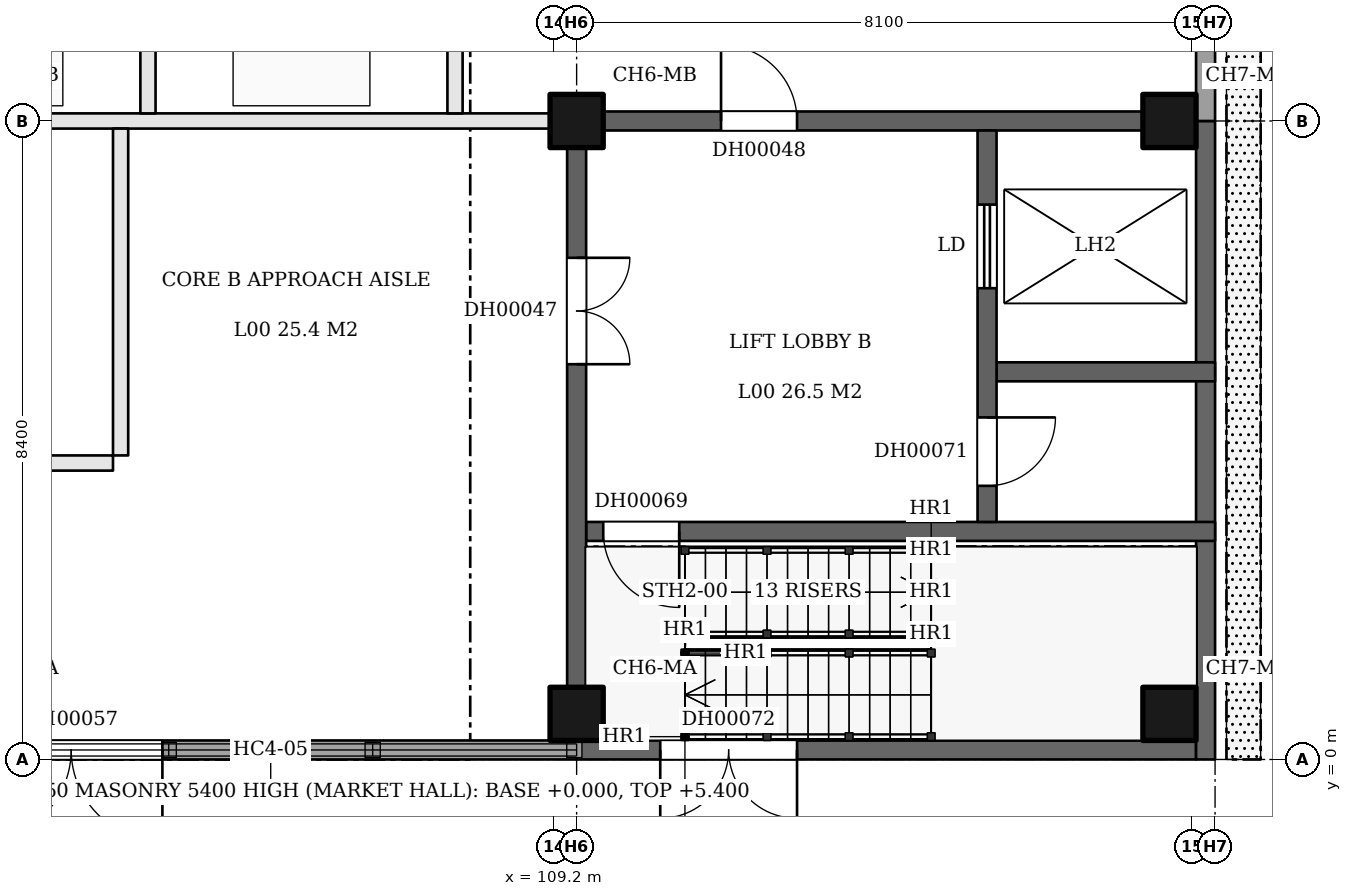
"""IFC4 building model, lengths in metres.
Left out: names, types, materials, properties, quantities, classifications, styles, units other than length and angle.
Written with IfcOpenShell. Run it as: python <this file> out.ifc"""

import sys

from ifc_helpers import new_model, si_unit, direction, frame, frame_2d, origin, origin_2d, place, context, subcontext, project, spatial, rectangle, extrude, element, fill, save


model = new_model("IFC4")
c1 = context("Model", 3, precision=1e-05, world=origin(), true_north=direction((0.0, 1.0)))
c2 = subcontext(c1, "Body", "Model", "MODEL_VIEW")
j1 = project(units=[si_unit("LENGTHUNIT", "METRE"), si_unit("PLANEANGLEUNIT", "RADIAN")], contexts=[c1])
p1 = place(None, origin())
s1 = spatial("IfcSite", under=j1, at=p1, CompositionType="ELEMENT")
p2 = place(p1, origin())
s2 = spatial("IfcBuilding", under=s1, at=p2, CompositionType="ELEMENT")
p3 = place(p2, origin())
s3 = spatial("IfcBuildingStorey", under=s2, at=p3, CompositionType="ELEMENT", Elevation=0.0)
for number, where, z_axis, x_axis in (
    (1, (109.5, 0.6, 0.0), (0.0, 0.0, 1.0), (1.0, 0.0, 0.0)),
    (2, (109.5, 8.4, 0.0), (0.0, 0.0, 1.0), (1.0, 0.0, 0.0)),
    (3, (117.3, 0.6, 0.0), (0.0, 0.0, 1.0), (1.0, 0.0, 0.0)),
    (4, (117.3, 8.4, 0.0), (0.0, 0.0, 1.0), (1.0, 0.0, 0.0)),
):
    element("IfcColumn", number, at=place(p3, frame(where, z_axis=z_axis, x_axis=x_axis)), inside=s3, PredefinedType="COLUMN", context=c2, shape_type="SweptSolid", body=[
        extrude(rectangle(XDim=0.7, YDim=0.7, at=origin_2d()), origin(), (0.0, 0.0, 1.0), 8.7),
    ])
p4 = place(p3, frame((101.45, 0.125, 0.0), z_axis=(0.0, 0.0, 1.0), x_axis=(1.0, 0.0, 0.0)))
e5 = element("IfcWall", 5, at=p4, inside=s3, PredefinedType="SOLIDWALL", context=c2, shape_type="SweptSolid", body=[
    extrude(rectangle(XDim=8.05, YDim=0.25, at=frame_2d((4.025, 0.0))), origin(), (0.0, 0.0, 1.0), 5.4),
])
p5 = place(p4, frame((0.2, 0.0, 0.0)))
e6 = element("IfcOpeningElement", 6, at=p5, cuts=e5, PredefinedType="OPENING", context=c2, shape_type="SweptSolid", body=[
    extrude(rectangle(XDim=2.4, YDim=2.4, at=frame_2d((1.2, 1.2))), frame((0.0, 0.135, 0.0), z_axis=(0.0, -1.0, 0.0), x_axis=(1.0, 0.0, 0.0)), (0.0, 0.0, 1.0), 0.27),
])
p6 = place(p3, frame((109.5, 0.125, 0.0), z_axis=(0.0, 0.0, 1.0), x_axis=(1.0, 0.0, 0.0)))
e7 = element("IfcWall", 7, at=p6, inside=s3, PredefinedType="SHEAR", context=c2, shape_type="SweptSolid", body=[
    extrude(rectangle(XDim=8.15, YDim=0.25, at=frame_2d((4.075, 0.0))), origin(), (0.0, 0.0, 1.0), 8.7),
])
p7 = place(p6, frame((1.1, 0.0, 0.0)))
e8 = element("IfcOpeningElement", 8, at=p7, cuts=e7, PredefinedType="OPENING", context=c2, shape_type="SweptSolid", body=[
    extrude(rectangle(XDim=1.8, YDim=2.1, at=frame_2d((0.9, 1.05))), frame((0.0, 0.135, 0.0), z_axis=(0.0, -1.0, 0.0), x_axis=(1.0, 0.0, 0.0)), (0.0, 0.0, 1.0), 0.27),
])
p8 = place(p3, frame((109.625, 3.0, 0.0), z_axis=(0.0, 0.0, 1.0), x_axis=(1.0, 0.0, 0.0)))
e9 = element("IfcWall", 9, at=p8, inside=s3, PredefinedType="SHEAR", context=c2, shape_type="SweptSolid", body=[
    extrude(rectangle(XDim=8.275, YDim=0.25, at=frame_2d((4.137, 0.0))), origin(), (0.0, 0.0, 1.0), 8.7),
])
p9 = place(p8, frame((0.225, 0.0, 0.0)))
e10 = element("IfcOpeningElement", 10, at=p9, cuts=e9, PredefinedType="OPENING", context=c2, shape_type="SweptSolid", body=[
    extrude(rectangle(XDim=1.0, YDim=2.1, at=frame_2d((0.5, 1.05))), frame((0.0, 0.135, 0.0), z_axis=(0.0, -1.0, 0.0), x_axis=(1.0, 0.0, 0.0)), (0.0, 0.0, 1.0), 0.27),
])
p10 = place(p3, frame((68.35, 3.9, 0.0), z_axis=(0.0, 0.0, 1.0), x_axis=(1.0, 0.0, 0.0)))
e11 = element("IfcWall", 11, at=p10, inside=s3, PredefinedType="PARTITIONING", context=c2, shape_type="SweptSolid", body=[
    extrude(rectangle(XDim=35.05, YDim=0.2, at=frame_2d((17.525, 0.0))), origin(), (0.0, 0.0, 1.0), 8.7),
])
p11 = place(p10, frame((1.65, 0.0, 0.0)))
e12 = element("IfcOpeningElement", 12, at=p11, cuts=e11, PredefinedType="OPENING", context=c2, shape_type="SweptSolid", body=[
    extrude(rectangle(XDim=1.0, YDim=2.1, at=frame_2d((0.5, 1.05))), frame((0.0, 0.11, 0.0), z_axis=(0.0, -1.0, 0.0), x_axis=(1.0, 0.0, 0.0)), (0.0, 0.0, 1.0), 0.22),
])
p12 = place(p10, frame((7.65, 0.0, 0.0)))
e13 = element("IfcOpeningElement", 13, at=p12, cuts=e11, PredefinedType="OPENING", context=c2, shape_type="SweptSolid", body=[
    extrude(rectangle(XDim=1.0, YDim=2.1, at=frame_2d((0.5, 1.05))), frame((0.0, 0.11, 0.0), z_axis=(0.0, -1.0, 0.0), x_axis=(1.0, 0.0, 0.0)), (0.0, 0.0, 1.0), 0.22),
])
p13 = place(p10, frame((13.65, 0.0, 0.0)))
e14 = element("IfcOpeningElement", 14, at=p13, cuts=e11, PredefinedType="OPENING", context=c2, shape_type="SweptSolid", body=[
    extrude(rectangle(XDim=1.0, YDim=2.1, at=frame_2d((0.5, 1.05))), frame((0.0, 0.11, 0.0), z_axis=(0.0, -1.0, 0.0), x_axis=(1.0, 0.0, 0.0)), (0.0, 0.0, 1.0), 0.22),
])
p14 = place(p10, frame((19.65, 0.0, 0.0)))
e15 = element("IfcOpeningElement", 15, at=p14, cuts=e11, PredefinedType="OPENING", context=c2, shape_type="SweptSolid", body=[
    extrude(rectangle(XDim=1.0, YDim=2.1, at=frame_2d((0.5, 1.05))), frame((0.0, 0.11, 0.0), z_axis=(0.0, -1.0, 0.0), x_axis=(1.0, 0.0, 0.0)), (0.0, 0.0, 1.0), 0.22),
])
p15 = place(p10, frame((25.65, 0.0, 0.0)))
e16 = element("IfcOpeningElement", 16, at=p15, cuts=e11, PredefinedType="OPENING", context=c2, shape_type="SweptSolid", body=[
    extrude(rectangle(XDim=1.0, YDim=2.1, at=frame_2d((0.5, 1.05))), frame((0.0, 0.11, 0.0), z_axis=(0.0, -1.0, 0.0), x_axis=(1.0, 0.0, 0.0)), (0.0, 0.0, 1.0), 0.22),
])
p16 = place(p10, frame((31.65, 0.0, 0.0)))
e17 = element("IfcOpeningElement", 17, at=p16, cuts=e11, PredefinedType="OPENING", context=c2, shape_type="SweptSolid", body=[
    extrude(rectangle(XDim=1.0, YDim=2.1, at=frame_2d((0.5, 1.05))), frame((0.0, 0.11, 0.0), z_axis=(0.0, -1.0, 0.0), x_axis=(1.0, 0.0, 0.0)), (0.0, 0.0, 1.0), 0.22),
])
p17 = place(p3, frame((115.025, 5.1, 0.0), z_axis=(0.0, 0.0, 1.0), x_axis=(1.0, 0.0, 0.0)))
e18 = element("IfcWall", 18, at=p17, inside=s3, PredefinedType="SHEAR", context=c2, shape_type="SweptSolid", body=[
    extrude(rectangle(XDim=2.875, YDim=0.25, at=frame_2d((1.438, 0.0))), origin(), (0.0, 0.0, 1.0), 8.7),
])
p18 = place(p3, frame((101.45, 8.4, 0.0), z_axis=(0.0, 0.0, 1.0), x_axis=(1.0, 0.0, 0.0)))
e19 = element("IfcWall", 19, at=p18, inside=s3, PredefinedType="PARTITIONING", context=c2, shape_type="SweptSolid", body=[
    extrude(rectangle(XDim=7.7, YDim=0.2, at=frame_2d((3.85, 0.0))), origin(), (0.0, 0.0, 1.0), 8.7),
])
p19 = place(p3, frame((109.85, 8.4, 0.0), z_axis=(0.0, 0.0, 1.0), x_axis=(1.0, 0.0, 0.0)))
e20 = element("IfcWall", 20, at=p19, inside=s3, PredefinedType="SHEAR", context=c2, shape_type="SweptSolid", body=[
    extrude(rectangle(XDim=7.1, YDim=0.25, at=frame_2d((3.55, 0.0))), origin(), (0.0, 0.0, 1.0), 8.7),
])
p20 = place(p19, frame((1.55, 0.0, 0.0)))
e21 = element("IfcOpeningElement", 21, at=p20, cuts=e20, PredefinedType="OPENING", context=c2, shape_type="SweptSolid", body=[
    extrude(rectangle(XDim=1.0, YDim=2.1, at=frame_2d((0.5, 1.05))), frame((0.0, 0.135, 0.0), z_axis=(0.0, -1.0, 0.0), x_axis=(1.0, 0.0, 0.0)), (0.0, 0.0, 1.0), 0.27),
])
p21 = place(p3, frame((103.5, 4.0, 0.0), z_axis=(0.0, 0.0, 1.0), x_axis=(0.0, 1.0, 0.0)))
e22 = element("IfcWall", 22, at=p21, inside=s3, PredefinedType="PARTITIONING", context=c2, shape_type="SweptSolid", body=[
    extrude(rectangle(XDim=4.3, YDim=0.2, at=frame_2d((2.15, 0.0))), origin(), (0.0, 0.0, 1.0), 8.7),
])
p22 = place(p3, frame((103.86, 8.5, 0.0), z_axis=(0.0, 0.0, 1.0), x_axis=(0.0, 1.0, 0.0)))
e23 = element("IfcWall", 23, at=p22, inside=s3, PredefinedType="PARTITIONING", context=c2, shape_type="SweptSolid", body=[
    extrude(rectangle(XDim=3.3, YDim=0.2, at=frame_2d((1.65, 0.0))), origin(), (0.0, 0.0, 1.0), 8.7),
])
p23 = place(p3, frame((107.9, 8.5, 0.0), z_axis=(0.0, 0.0, 1.0), x_axis=(0.0, 1.0, 0.0)))
e24 = element("IfcWall", 24, at=p23, inside=s3, PredefinedType="PARTITIONING", context=c2, shape_type="SweptSolid", body=[
    extrude(rectangle(XDim=25.1, YDim=0.2, at=frame_2d((12.55, 0.0))), origin(), (0.0, 0.0, 1.0), 8.7),
])
p24 = place(p23, frame((3.8, 0.0, 0.0)))
e25 = element("IfcOpeningElement", 25, at=p24, cuts=e24, PredefinedType="OPENING", context=c2, shape_type="SweptSolid", body=[
    extrude(rectangle(XDim=1.0, YDim=2.1, at=frame_2d((0.5, 1.05))), frame((0.0, 0.11, 0.0), z_axis=(0.0, -1.0, 0.0), x_axis=(1.0, 0.0, 0.0)), (0.0, 0.0, 1.0), 0.22),
])
p25 = place(p23, frame((10.0, 0.0, 0.0)))
e26 = element("IfcOpeningElement", 26, at=p25, cuts=e24, PredefinedType="OPENING", context=c2, shape_type="SweptSolid", body=[
    extrude(rectangle(XDim=1.0, YDim=2.1, at=frame_2d((0.5, 1.05))), frame((0.0, 0.11, 0.0), z_axis=(0.0, -1.0, 0.0), x_axis=(1.0, 0.0, 0.0)), (0.0, 0.0, 1.0), 0.22),
])
p26 = place(p23, frame((22.5, 0.0, 0.0)))
e27 = element("IfcOpeningElement", 27, at=p26, cuts=e24, PredefinedType="OPENING", context=c2, shape_type="SweptSolid", body=[
    extrude(rectangle(XDim=1.0, YDim=2.1, at=frame_2d((0.5, 1.05))), frame((0.0, 0.11, 0.0), z_axis=(0.0, -1.0, 0.0), x_axis=(1.0, 0.0, 0.0)), (0.0, 0.0, 1.0), 0.22),
])
p27 = place(p3, frame((109.5, 0.95, 0.0), z_axis=(0.0, 0.0, 1.0), x_axis=(0.0, 1.0, 0.0)))
e28 = element("IfcWall", 28, at=p27, inside=s3, PredefinedType="SHEAR", context=c2, shape_type="SweptSolid", body=[
    extrude(rectangle(XDim=7.1, YDim=0.25, at=frame_2d((3.55, 0.0))), origin(), (0.0, 0.0, 1.0), 8.7),
])
p28 = place(p27, frame((4.25, 0.0, 0.0)))
e29 = element("IfcOpeningElement", 29, at=p28, cuts=e28, PredefinedType="OPENING", context=c2, shape_type="SweptSolid", body=[
    extrude(rectangle(XDim=1.4, YDim=2.1, at=frame_2d((0.7, 1.05))), frame((0.0, 0.135, 0.0), z_axis=(0.0, -1.0, 0.0), x_axis=(1.0, 0.0, 0.0)), (0.0, 0.0, 1.0), 0.27),
])
p29 = place(p3, frame((114.9, 3.125, 0.0), z_axis=(0.0, 0.0, 1.0), x_axis=(0.0, 1.0, 0.0)))
e30 = element("IfcWall", 30, at=p29, inside=s3, PredefinedType="SHEAR", context=c2, shape_type="SweptSolid", body=[
    extrude(rectangle(XDim=5.15, YDim=0.25, at=frame_2d((2.575, 0.0))), origin(), (0.0, 0.0, 1.0), 8.7),
])
p30 = place(p29, frame((3.075, 0.0, 0.0)))
e31 = element("IfcOpeningElement", 31, at=p30, cuts=e30, PredefinedType="OPENING", context=c2, shape_type="SweptSolid", body=[
    extrude(rectangle(XDim=1.1, YDim=2.1, at=frame_2d((0.55, 1.05))), frame((0.0, 0.135, 0.0), z_axis=(0.0, -1.0, 0.0), x_axis=(1.0, 0.0, 0.0)), (0.0, 0.0, 1.0), 0.27),
])
p31 = place(p29, frame((0.475, 0.0, 0.0)))
e32 = element("IfcOpeningElement", 32, at=p31, cuts=e30, PredefinedType="OPENING", context=c2, shape_type="SweptSolid", body=[
    extrude(rectangle(XDim=0.9, YDim=2.1, at=frame_2d((0.45, 1.05))), frame((0.0, 0.135, 0.0), z_axis=(0.0, -1.0, 0.0), x_axis=(1.0, 0.0, 0.0)), (0.0, 0.0, 1.0), 0.27),
])
p32 = place(p3, frame((117.775, 0.0, 0.0), z_axis=(0.0, 0.0, 1.0), x_axis=(0.0, 1.0, 0.0)))
e33 = element("IfcWall", 33, at=p32, inside=s3, PredefinedType="SHEAR", context=c2, shape_type="SweptSolid", body=[
    extrude(rectangle(XDim=8.4, YDim=0.25, at=frame_2d((4.2, 0.0))), origin(), (0.0, 0.0, 1.0), 8.7),
])
p33 = place(p3, frame((117.775, 8.4, 0.0), z_axis=(0.0, 0.0, 1.0), x_axis=(0.0, 1.0, 0.0)))
e34 = element("IfcWall", 34, at=p33, inside=s3, PredefinedType="SOLIDWALL", context=c2, shape_type="SweptSolid", body=[
    extrude(rectangle(XDim=16.8, YDim=0.25, at=frame_2d((8.4, 0.0))), origin(), (0.0, 0.0, 1.0), 8.7),
])
p34 = place(p33, frame((1.15, 0.0, 0.0)))
e35 = element("IfcOpeningElement", 35, at=p34, cuts=e34, PredefinedType="OPENING", context=c2, shape_type="SweptSolid", body=[
    extrude(rectangle(XDim=3.0, YDim=4.5, at=frame_2d((1.5, 2.25))), frame((0.0, 0.135, 0.0), z_axis=(0.0, -1.0, 0.0), x_axis=(1.0, 0.0, 0.0)), (0.0, 0.0, 1.0), 0.27),
])
p35 = place(p33, frame((4.65, 0.0, 0.0)))
e36 = element("IfcOpeningElement", 36, at=p35, cuts=e34, PredefinedType="OPENING", context=c2, shape_type="SweptSolid", body=[
    extrude(rectangle(XDim=3.0, YDim=4.5, at=frame_2d((1.5, 2.25))), frame((0.0, 0.135, 0.0), z_axis=(0.0, -1.0, 0.0), x_axis=(1.0, 0.0, 0.0)), (0.0, 0.0, 1.0), 0.27),
])
p36 = place(p28, frame((1.4, 0.0, 0.0), z_axis=(0.0, 0.0, 1.0), x_axis=(-1.0, 0.0, 0.0)))
e37 = element("IfcDoor", 37, at=p36, inside=s3, OperationType="DOUBLE_DOOR_SINGLE_SWING", PredefinedType="DOOR", context=c2, shape_type="SweptSolid", body=[
    extrude(rectangle(XDim=1.4, YDim=2.1, at=frame_2d((0.7, 1.05))), frame((0.0, 0.025, 0.0), z_axis=(0.0, -1.0, 0.0), x_axis=(1.0, 0.0, 0.0)), (0.0, 0.0, 1.0), 0.05),
])
fill(e29, e37)
p37 = place(p20, origin())
e38 = element("IfcDoor", 38, at=p37, inside=s3, OperationType="SINGLE_SWING_LEFT", PredefinedType="DOOR", context=c2, shape_type="SweptSolid", body=[
    extrude(rectangle(XDim=1.0, YDim=2.1, at=frame_2d((0.5, 1.05))), frame((0.0, 0.025, 0.0), z_axis=(0.0, -1.0, 0.0), x_axis=(1.0, 0.0, 0.0)), (0.0, 0.0, 1.0), 0.05),
])
fill(e21, e38)
p38 = place(p5, frame((2.4, 0.0, 0.0), z_axis=(0.0, 0.0, 1.0), x_axis=(-1.0, 0.0, 0.0)))
e39 = element("IfcDoor", 39, at=p38, inside=s3, OperationType="DOUBLE_DOOR_SINGLE_SWING", PredefinedType="DOOR", context=c2, shape_type="SweptSolid", body=[
    extrude(rectangle(XDim=2.4, YDim=2.4, at=frame_2d((1.2, 1.2))), frame((0.0, 0.025, 0.0), z_axis=(0.0, -1.0, 0.0), x_axis=(1.0, 0.0, 0.0)), (0.0, 0.0, 1.0), 0.05),
])
fill(e6, e39)
p39 = place(p9, frame((1.0, 0.0, 0.0), z_axis=(0.0, 0.0, 1.0), x_axis=(-1.0, 0.0, 0.0)))
e40 = element("IfcDoor", 40, at=p39, inside=s3, OperationType="SINGLE_SWING_LEFT", PredefinedType="DOOR", context=c2, shape_type="SweptSolid", body=[
    extrude(rectangle(XDim=1.0, YDim=2.1, at=frame_2d((0.5, 1.05))), frame((0.0, 0.025, 0.0), z_axis=(0.0, -1.0, 0.0), x_axis=(1.0, 0.0, 0.0)), (0.0, 0.0, 1.0), 0.05),
])
fill(e10, e40)
p40 = place(p30, origin())
e41 = element("IfcDoor", 41, at=p40, inside=s3, OperationType="SLIDING_TO_LEFT", PredefinedType="DOOR", context=c2, shape_type="SweptSolid", body=[
    extrude(rectangle(XDim=1.1, YDim=2.1, at=frame_2d((0.55, 1.05))), frame((0.0, 0.025, 0.0), z_axis=(0.0, -1.0, 0.0), x_axis=(1.0, 0.0, 0.0)), (0.0, 0.0, 1.0), 0.05),
])
fill(e31, e41)
p41 = place(p31, frame((0.9, 0.0, 0.0), z_axis=(0.0, 0.0, 1.0), x_axis=(-1.0, 0.0, 0.0)))
e42 = element("IfcDoor", 42, at=p41, inside=s3, OperationType="SINGLE_SWING_LEFT", PredefinedType="DOOR", context=c2, shape_type="SweptSolid", body=[
    extrude(rectangle(XDim=0.9, YDim=2.1, at=frame_2d((0.45, 1.05))), frame((0.0, 0.025, 0.0), z_axis=(0.0, -1.0, 0.0), x_axis=(1.0, 0.0, 0.0)), (0.0, 0.0, 1.0), 0.05),
])
fill(e32, e42)
p42 = place(p7, frame((1.8, 0.0, 0.0), z_axis=(0.0, 0.0, 1.0), x_axis=(-1.0, 0.0, 0.0)))
e43 = element("IfcDoor", 43, at=p42, inside=s3, OperationType="DOUBLE_DOOR_SINGLE_SWING", PredefinedType="DOOR", context=c2, shape_type="SweptSolid", body=[
    extrude(rectangle(XDim=1.8, YDim=2.1, at=frame_2d((0.9, 1.05))), frame((0.0, 0.025, 0.0), z_axis=(0.0, -1.0, 0.0), x_axis=(1.0, 0.0, 0.0)), (0.0, 0.0, 1.0), 0.05),
])
fill(e8, e43)
save(model, sys.argv[1])
